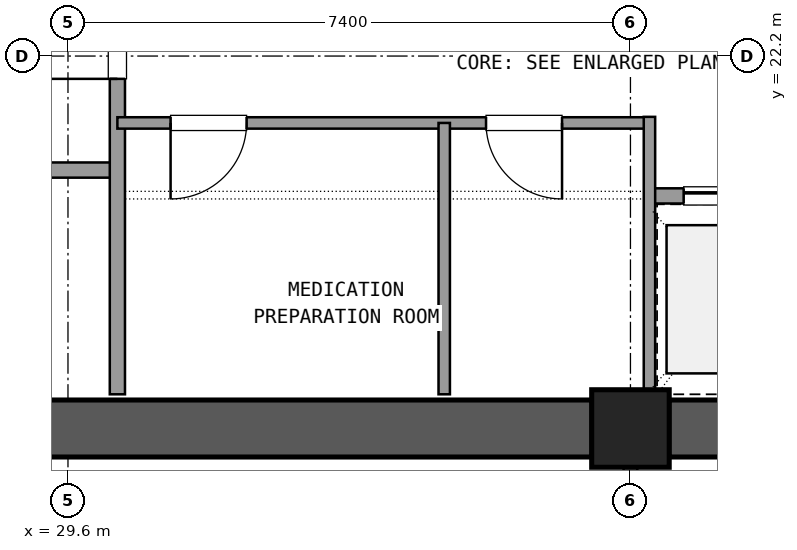
"""IFC4 building model, lengths in metres.
Left out: names, types, materials, properties, quantities, classifications, styles, units other than length and angle.
Written with IfcOpenShell. Run it as: python <this file> out.ifc"""

import sys

from ifc_helpers import new_model, si_unit, direction, frame, frame_2d, origin, origin_2d, place, context, subcontext, project, spatial, rectangle, extrude, element, fill, save


model = new_model("IFC4")
c1 = context("Model", 3, precision=1e-05, world=origin(), true_north=direction((0.0, 1.0)))
c2 = subcontext(c1, "Body", "Model", "MODEL_VIEW")
j1 = project(units=[si_unit("LENGTHUNIT", "METRE"), si_unit("PLANEANGLEUNIT", "RADIAN")], contexts=[c1])
p1 = place(None, origin())
s1 = spatial("IfcSite", under=j1, at=p1, CompositionType="ELEMENT")
p2 = place(p1, origin())
s2 = spatial("IfcBuilding", under=s1, at=p2, CompositionType="ELEMENT")
p3 = place(p2, frame((0.0, 0.0, 145.62)))
s3 = spatial("IfcBuildingStorey", under=s2, at=p3, CompositionType="ELEMENT", Elevation=145.62)
p4 = place(p3, frame((37.0, 17.3, 0.0), z_axis=(0.0, 0.0, 1.0), x_axis=(1.0, 0.0, 0.0)))
e1 = element("IfcColumn", 1, at=p4, inside=s3, PredefinedType="COLUMN", context=c2, shape_type="SweptSolid", body=[
    extrude(rectangle(XDim=1.02, YDim=1.02, at=origin_2d()), origin(), (0.0, 0.0, 1.0), 3.6),
])
for number, where, z_axis, x_axis in (
    (2, (26.305, 17.3, 0.0), (0.0, 0.0, 1.0), (1.0, 0.0, 0.0)),
    (3, (37.505, 17.3, 0.0), (0.0, 0.0, 1.0), (1.0, 0.0, 0.0)),
):
    element("IfcWall", number, at=place(p3, frame(where, z_axis=z_axis, x_axis=x_axis)), inside=s3, PredefinedType="SHEAR", context=c2, shape_type="SweptSolid", body=[
        extrude(rectangle(XDim=10.19, YDim=0.75, at=frame_2d((5.095, 0.0))), origin(), (0.0, 0.0, 1.0), 3.32),
    ])
p5 = place(p3, frame((26.25, 20.7, 0.0), z_axis=(0.0, 0.0, 1.0), x_axis=(1.0, 0.0, 0.0)))
e4 = element("IfcWall", 4, at=p5, inside=s3, PredefinedType="SOLIDWALL", context=c2, shape_type="SweptSolid", body=[
    extrude(rectangle(XDim=4.0, YDim=0.2, at=frame_2d((2.0, 0.0))), origin(), (0.0, 0.0, 1.0), 2.61),
])
p6 = place(p5, frame((0.65, 0.0, 0.0)))
e5 = element("IfcOpeningElement", 5, at=p6, cuts=e4, PredefinedType="OPENING", context=c2, shape_type="SweptSolid", body=[
    extrude(rectangle(XDim=1.2, YDim=2.15, at=frame_2d((0.6, 1.075))), frame((0.0, 0.11, 0.0), z_axis=(0.0, -1.0, 0.0), x_axis=(1.0, 0.0, 0.0)), (0.0, 0.0, 1.0), 0.22),
])
p7 = place(p3, frame((30.25, 17.75, 0.0), z_axis=(0.0, 0.0, 1.0), x_axis=(0.0, 1.0, 0.0)))
e6 = element("IfcWall", 6, at=p7, inside=s3, PredefinedType="SOLIDWALL", context=c2, shape_type="SweptSolid", body=[
    extrude(rectangle(XDim=6.9, YDim=0.2, at=frame_2d((3.45, 0.0))), origin(), (0.0, 0.0, 1.0), 2.61),
])
p8 = place(p7, frame((4.15, 0.0, 0.0)))
e7 = element("IfcOpeningElement", 7, at=p8, cuts=e6, PredefinedType="OPENING", context=c2, shape_type="SweptSolid", body=[
    extrude(rectangle(XDim=1.2, YDim=2.15, at=frame_2d((0.6, 1.075))), frame((0.0, 0.11, 0.0), z_axis=(0.0, -1.0, 0.0), x_axis=(1.0, 0.0, 0.0)), (0.0, 0.0, 1.0), 0.22),
])
p9 = place(p3, frame((30.25, 21.32, 0.0), z_axis=(0.0, 0.0, 1.0), x_axis=(1.0, 0.0, 0.0)))
e8 = element("IfcWall", 8, at=p9, inside=s3, PredefinedType="PARTITIONING", context=c2, shape_type="SweptSolid", body=[
    extrude(rectangle(XDim=7.0, YDim=0.15, at=frame_2d((3.5, 0.0))), origin(), (0.0, 0.0, 1.0), 2.61),
])
p10 = place(p9, frame((0.7, 0.0, 0.0)))
e9 = element("IfcOpeningElement", 9, at=p10, cuts=e8, PredefinedType="OPENING", context=c2, shape_type="SweptSolid", body=[
    extrude(rectangle(XDim=1.0, YDim=2.15, at=frame_2d((0.5, 1.075))), frame((0.0, 0.085, 0.0), z_axis=(0.0, -1.0, 0.0), x_axis=(1.0, 0.0, 0.0)), (0.0, 0.0, 1.0), 0.17),
])
p11 = place(p9, frame((4.85, 0.0, 0.0)))
e10 = element("IfcOpeningElement", 10, at=p11, cuts=e8, PredefinedType="OPENING", context=c2, shape_type="SweptSolid", body=[
    extrude(rectangle(XDim=1.0, YDim=2.15, at=frame_2d((0.5, 1.075))), frame((0.0, 0.085, 0.0), z_axis=(0.0, -1.0, 0.0), x_axis=(1.0, 0.0, 0.0)), (0.0, 0.0, 1.0), 0.17),
])
p12 = place(p3, frame((34.55, 17.75, 0.0), z_axis=(0.0, 0.0, 1.0), x_axis=(0.0, 1.0, 0.0)))
e11 = element("IfcWall", 11, at=p12, inside=s3, PredefinedType="PARTITIONING", context=c2, shape_type="SweptSolid", body=[
    extrude(rectangle(XDim=3.57, YDim=0.15, at=frame_2d((1.785, 0.0))), origin(), (0.0, 0.0, 1.0), 2.61),
])
p13 = place(p3, frame((37.25, 20.36, 0.0), z_axis=(0.0, 0.0, 1.0), x_axis=(1.0, 0.0, 0.0)))
e12 = element("IfcWall", 12, at=p13, inside=s3, PredefinedType="SOLIDWALL", context=c2, shape_type="SweptSolid", body=[
    extrude(rectangle(XDim=6.1, YDim=0.2, at=frame_2d((3.05, 0.0))), origin(), (0.0, 0.0, 1.0), 2.61),
])
p14 = place(p13, frame((0.45, 0.0, 0.0)))
e13 = element("IfcOpeningElement", 13, at=p14, cuts=e12, PredefinedType="OPENING", context=c2, shape_type="SweptSolid", body=[
    extrude(rectangle(XDim=1.1, YDim=2.15, at=frame_2d((0.55, 1.075))), frame((0.0, 0.11, 0.0), z_axis=(0.0, -1.0, 0.0), x_axis=(1.0, 0.0, 0.0)), (0.0, 0.0, 1.0), 0.22),
])
p15 = place(p13, frame((2.5, 0.0, 0.0)))
e14 = element("IfcOpeningElement", 14, at=p15, cuts=e12, PredefinedType="OPENING", context=c2, shape_type="SweptSolid", body=[
    extrude(rectangle(XDim=1.1, YDim=2.15, at=frame_2d((0.55, 1.075))), frame((0.0, 0.11, 0.0), z_axis=(0.0, -1.0, 0.0), x_axis=(1.0, 0.0, 0.0)), (0.0, 0.0, 1.0), 0.22),
])
p16 = place(p13, frame((4.55, 0.0, 0.0)))
e15 = element("IfcOpeningElement", 15, at=p16, cuts=e12, PredefinedType="OPENING", context=c2, shape_type="SweptSolid", body=[
    extrude(rectangle(XDim=1.1, YDim=2.15, at=frame_2d((0.55, 1.075))), frame((0.0, 0.11, 0.0), z_axis=(0.0, -1.0, 0.0), x_axis=(1.0, 0.0, 0.0)), (0.0, 0.0, 1.0), 0.22),
])
p17 = place(p3, frame((37.25, 17.75, 0.0), z_axis=(0.0, 0.0, 1.0), x_axis=(0.0, 1.0, 0.0)))
e16 = element("IfcWall", 16, at=p17, inside=s3, PredefinedType="PARTITIONING", context=c2, shape_type="SweptSolid", body=[
    extrude(rectangle(XDim=3.65, YDim=0.15, at=frame_2d((1.825, 0.0))), origin(), (0.0, 0.0, 1.0), 2.61),
])
p18 = place(p3, frame((37.0, 13.64, 0.0), z_axis=(0.0, 0.0, 1.0), x_axis=(0.0, 1.0, 0.0)))
e17 = element("IfcWall", 17, at=p18, inside=s3, PredefinedType="PARTITIONING", context=c2, shape_type="SweptSolid", body=[
    extrude(rectangle(XDim=3.21, YDim=0.18, at=frame_2d((1.605, 0.0))), origin(), (0.0, 0.0, 1.0), 2.61),
])
p19 = place(p18, frame((0.605, 0.0, 0.0)))
e18 = element("IfcOpeningElement", 18, at=p19, cuts=e17, PredefinedType="OPENING", context=c2, shape_type="SweptSolid", body=[
    extrude(rectangle(XDim=2.0, YDim=2.2, at=frame_2d((1.0, 1.1))), frame((0.0, 0.1, 0.0), z_axis=(0.0, -1.0, 0.0), x_axis=(1.0, 0.0, 0.0)), (0.0, 0.0, 1.0), 0.2),
])
p20 = place(p8, origin())
e19 = element("IfcDoor", 19, at=p20, inside=s3, OperationType="SINGLE_SWING_LEFT", PredefinedType="DOOR", context=c2, shape_type="SweptSolid", body=[
    extrude(rectangle(XDim=1.2, YDim=2.15, at=frame_2d((0.6, 1.075))), frame((0.0, 0.025, 0.0), z_axis=(0.0, -1.0, 0.0), x_axis=(1.0, 0.0, 0.0)), (0.0, 0.0, 1.0), 0.05),
])
fill(e7, e19)
p21 = place(p10, frame((1.0, 0.0, 0.0), z_axis=(0.0, 0.0, 1.0), x_axis=(-1.0, 0.0, 0.0)))
e20 = element("IfcDoor", 20, at=p21, inside=s3, OperationType="SINGLE_SWING_LEFT", PredefinedType="DOOR", context=c2, shape_type="SweptSolid", body=[
    extrude(rectangle(XDim=1.0, YDim=2.15, at=frame_2d((0.5, 1.075))), frame((0.0, 0.025, 0.0), z_axis=(0.0, -1.0, 0.0), x_axis=(1.0, 0.0, 0.0)), (0.0, 0.0, 1.0), 0.05),
])
fill(e9, e20)
p22 = place(p11, frame((1.0, 0.0, 0.0), z_axis=(0.0, 0.0, 1.0), x_axis=(-1.0, 0.0, 0.0)))
e21 = element("IfcDoor", 21, at=p22, inside=s3, OperationType="SINGLE_SWING_RIGHT", PredefinedType="DOOR", context=c2, shape_type="SweptSolid", body=[
    extrude(rectangle(XDim=1.0, YDim=2.15, at=frame_2d((0.5, 1.075))), frame((0.0, 0.025, 0.0), z_axis=(0.0, -1.0, 0.0), x_axis=(1.0, 0.0, 0.0)), (0.0, 0.0, 1.0), 0.05),
])
fill(e10, e21)
p23 = place(p14, origin())
e22 = element("IfcDoor", 22, at=p23, inside=s3, OperationType="SLIDING_TO_LEFT", PredefinedType="DOOR", context=c2, shape_type="SweptSolid", body=[
    extrude(rectangle(XDim=1.1, YDim=2.15, at=frame_2d((0.55, 1.075))), frame((0.0, 0.025, 0.0), z_axis=(0.0, -1.0, 0.0), x_axis=(1.0, 0.0, 0.0)), (0.0, 0.0, 1.0), 0.05),
])
fill(e13, e22)
save(model, sys.argv[1])
